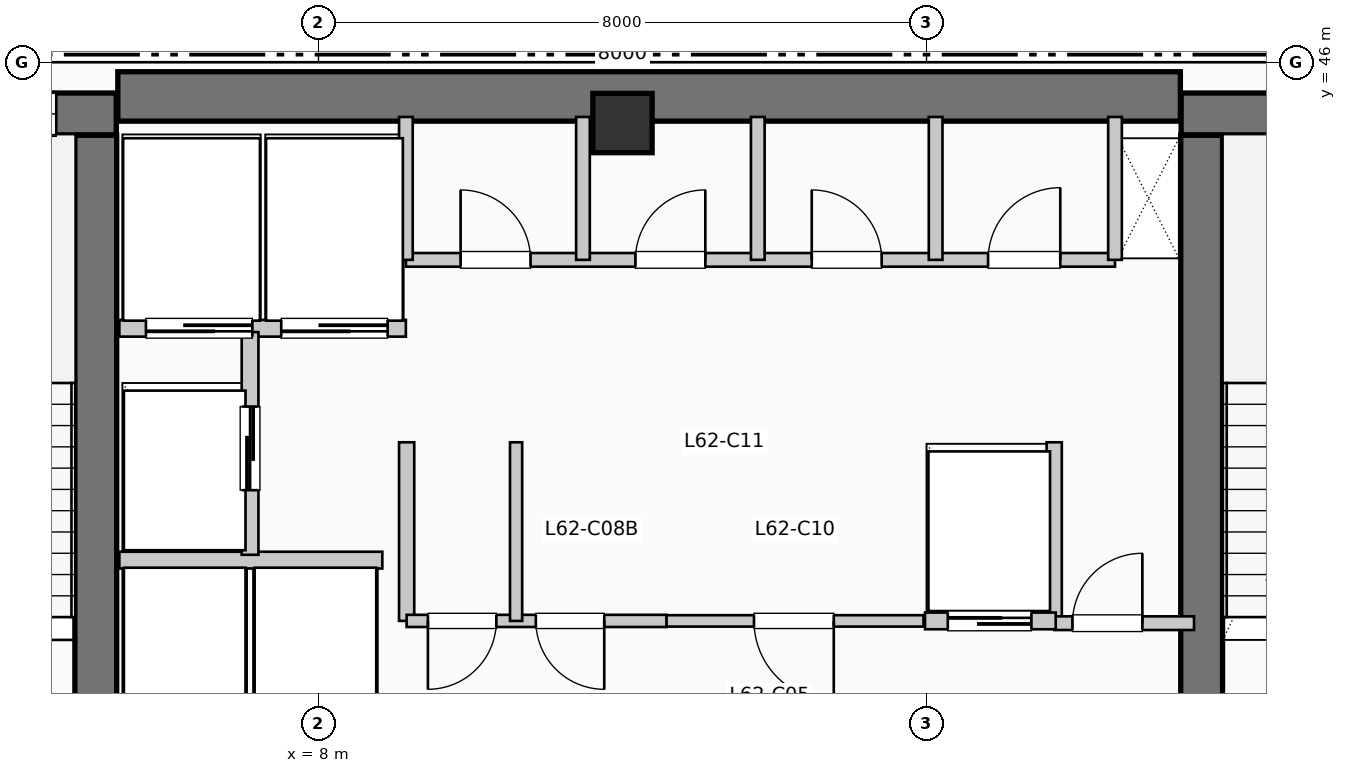
"""IFC4 building model, lengths in metres.
Left out: names, types, materials, properties, quantities, classifications, styles, units other than length and angle.
Written with IfcOpenShell. Run it as: python <this file> out.ifc"""

import sys

from ifc_helpers import new_model, si_unit, direction, frame, frame_2d, origin, origin_2d, place, context, subcontext, project, spatial, rectangle, extrude, element, fill, save


model = new_model("IFC4")
c1 = context("Model", 3, precision=1e-05, world=origin(), true_north=direction((0.0, 1.0)))
c2 = subcontext(c1, "Body", "Model", "MODEL_VIEW")
j1 = project(units=[si_unit("LENGTHUNIT", "METRE"), si_unit("PLANEANGLEUNIT", "RADIAN")], contexts=[c1])
p1 = place(None, origin())
s1 = spatial("IfcSite", under=j1, at=p1, CompositionType="ELEMENT")
p2 = place(p1, origin())
s2 = spatial("IfcBuilding", under=s1, at=p2, CompositionType="ELEMENT")
p3 = place(p2, frame((0.0, 0.0, 256.41)))
s3 = spatial("IfcBuildingStorey", under=s2, at=p3, CompositionType="ELEMENT", Elevation=256.41)
p4 = place(p3, frame((5.36, 45.55, 0.0), z_axis=(0.0, 0.0, 1.0), x_axis=(1.0, 0.0, 0.0)))
e1 = element("IfcWall", 1, at=p4, inside=s3, PredefinedType="SHEAR", context=c2, shape_type="SweptSolid", body=[
    extrude(rectangle(XDim=13.98, YDim=0.65, at=frame_2d((6.99, 0.0))), origin(), (0.0, 0.0, 1.0), 3.96),
])
p5 = place(p3, frame((5.07, 37.15, 0.0), z_axis=(0.0, 0.0, 1.0), x_axis=(0.0, 1.0, 0.0)))
e2 = element("IfcWall", 2, at=p5, inside=s3, PredefinedType="SHEAR", context=c2, shape_type="SweptSolid", body=[
    extrude(rectangle(XDim=7.89, YDim=0.55, at=frame_2d((3.945, 0.0))), origin(), (0.0, 0.0, 1.0), 3.96),
])
p6 = place(p3, frame((1.1, 45.32, 0.0), z_axis=(0.0, 0.0, 1.0), x_axis=(1.0, 0.0, 0.0)))
e3 = element("IfcWall", 3, at=p6, inside=s3, PredefinedType="SHEAR", context=c2, shape_type="SweptSolid", body=[
    extrude(rectangle(XDim=4.24, YDim=0.55, at=frame_2d((2.12, 0.0))), origin(), (0.0, 0.0, 1.0), 3.96),
])
p7 = place(p6, frame((2.05, 0.0, 1.05)))
e4 = element("IfcOpeningElement", 4, at=p7, cuts=e3, PredefinedType="OPENING", context=c2, shape_type="SweptSolid", body=[
    extrude(rectangle(XDim=1.4, YDim=1.8, at=frame_2d((0.7, 0.9))), frame((0.0, 0.285, 0.0), z_axis=(0.0, -1.0, 0.0), x_axis=(1.0, 0.0, 0.0)), (0.0, 0.0, 1.0), 0.57),
])
p8 = place(p3, frame((19.62, 37.15, 0.0), z_axis=(0.0, 0.0, 1.0), x_axis=(0.0, 1.0, 0.0)))
e5 = element("IfcWall", 5, at=p8, inside=s3, PredefinedType="SHEAR", context=c2, shape_type="SweptSolid", body=[
    extrude(rectangle(XDim=7.89, YDim=0.55, at=frame_2d((3.945, 0.0))), origin(), (0.0, 0.0, 1.0), 3.96),
])
p9 = place(p3, frame((19.35, 45.32, 0.0), z_axis=(0.0, 0.0, 1.0), x_axis=(1.0, 0.0, 0.0)))
e6 = element("IfcWall", 6, at=p9, inside=s3, PredefinedType="SHEAR", context=c2, shape_type="SweptSolid", body=[
    extrude(rectangle(XDim=3.69, YDim=0.55, at=frame_2d((1.845, 0.0))), origin(), (0.0, 0.0, 1.0), 3.96),
])
p10 = place(p9, frame((1.15, 0.0, 1.05)))
e7 = element("IfcOpeningElement", 7, at=p10, cuts=e6, PredefinedType="OPENING", context=c2, shape_type="SweptSolid", body=[
    extrude(rectangle(XDim=1.4, YDim=1.8, at=frame_2d((0.7, 0.9))), frame((0.0, 0.285, 0.0), z_axis=(0.0, -1.0, 0.0), x_axis=(1.0, 0.0, 0.0)), (0.0, 0.0, 1.0), 0.57),
])
p11 = place(p3, frame((12.0, 45.2, 0.0), z_axis=(0.0, 0.0, 1.0), x_axis=(1.0, 0.0, 0.0)))
e8 = element("IfcColumn", 8, at=p11, inside=s3, PredefinedType="COLUMN", context=c2, shape_type="SweptSolid", body=[
    extrude(rectangle(XDim=0.78, YDim=0.78, at=origin_2d()), origin(), (0.0, 0.0, 1.0), 3.96),
])
p12 = place(p3, frame((5.38, 39.45, 0.0), z_axis=(0.0, 0.0, 1.0), x_axis=(1.0, 0.0, 0.0)))
e9 = element("IfcWall", 9, at=p12, inside=s3, PredefinedType="PARTITIONING", context=c2, shape_type="SweptSolid", body=[
    extrude(rectangle(XDim=3.46, YDim=0.22, at=frame_2d((1.73, 0.0))), origin(), (0.0, 0.0, 1.0), 3.71),
])
p13 = place(p3, frame((5.38, 42.5, 0.0), z_axis=(0.0, 0.0, 1.0), x_axis=(1.0, 0.0, 0.0)))
e10 = element("IfcWall", 10, at=p13, inside=s3, PredefinedType="PARTITIONING", context=c2, shape_type="SweptSolid", body=[
    extrude(rectangle(XDim=3.77, YDim=0.22, at=frame_2d((1.885, 0.0))), origin(), (0.0, 0.0, 1.0), 3.71),
])
p14 = place(p13, frame((1.75, 0.0, 0.0), z_axis=(0.0, 0.0, 1.0), x_axis=(-1.0, 0.0, 0.0)))
e11 = element("IfcOpeningElement", 11, at=p14, cuts=e10, PredefinedType="OPENING", context=c2, shape_type="SweptSolid", body=[
    extrude(rectangle(XDim=1.4, YDim=2.2, at=frame_2d((0.7, 1.1))), frame((0.0, 0.12, 0.0), z_axis=(0.0, -1.0, 0.0), x_axis=(1.0, 0.0, 0.0)), (0.0, 0.0, 1.0), 0.24),
])
p15 = place(p13, frame((3.53, 0.0, 0.0), z_axis=(0.0, 0.0, 1.0), x_axis=(-1.0, 0.0, 0.0)))
e12 = element("IfcOpeningElement", 12, at=p15, cuts=e10, PredefinedType="OPENING", context=c2, shape_type="SweptSolid", body=[
    extrude(rectangle(XDim=1.4, YDim=2.2, at=frame_2d((0.7, 1.1))), frame((0.0, 0.12, 0.0), z_axis=(0.0, -1.0, 0.0), x_axis=(1.0, 0.0, 0.0)), (0.0, 0.0, 1.0), 0.24),
])
p16 = place(p3, frame((7.1, 39.52, 0.0), z_axis=(0.0, 0.0, 1.0), x_axis=(0.0, 1.0, 0.0)))
e13 = element("IfcWall", 13, at=p16, inside=s3, PredefinedType="PARTITIONING", context=c2, shape_type="SweptSolid", body=[
    extrude(rectangle(XDim=2.93, YDim=0.22, at=frame_2d((1.465, 0.0))), origin(), (0.0, 0.0, 1.0), 3.71),
])
p17 = place(p16, frame((0.85, 0.0, 0.0)))
e14 = element("IfcOpeningElement", 14, at=p17, cuts=e13, PredefinedType="OPENING", context=c2, shape_type="SweptSolid", body=[
    extrude(rectangle(XDim=1.1, YDim=2.2, at=frame_2d((0.55, 1.1))), frame((0.0, 0.12, 0.0), z_axis=(0.0, -1.0, 0.0), x_axis=(1.0, 0.0, 0.0)), (0.0, 0.0, 1.0), 0.24),
])
for number, where, z_axis, x_axis in (
    (15, (9.16, 38.65, 0.0), (0.0, 0.0, 1.0), (0.0, 1.0, 0.0)),
    (16, (17.68, 38.65, 0.0), (0.0, 0.0, 1.0), (0.0, 1.0, 0.0)),
):
    element("IfcWall", number, at=place(p3, frame(where, z_axis=z_axis, x_axis=x_axis)), inside=s3, PredefinedType="PARTITIONING", context=c2, shape_type="SweptSolid", body=[
        extrude(rectangle(XDim=2.35, YDim=0.2, at=frame_2d((1.175, 0.0))), origin(), (0.0, 0.0, 1.0), 3.71),
    ])
p18 = place(p3, frame((17.68, 38.62, 0.0), z_axis=(0.0, 0.0, 1.0), x_axis=(1.0, 0.0, 0.0)))
e17 = element("IfcWall", 17, at=p18, inside=s3, PredefinedType="PARTITIONING", context=c2, shape_type="SweptSolid", body=[
    extrude(rectangle(XDim=1.84, YDim=0.18, at=frame_2d((0.92, 0.0))), origin(), (0.0, 0.0, 1.0), 3.71),
])
p19 = place(p18, frame((0.24, 0.0, 0.0)))
e18 = element("IfcOpeningElement", 18, at=p19, cuts=e17, PredefinedType="OPENING", context=c2, shape_type="SweptSolid", body=[
    extrude(rectangle(XDim=0.92, YDim=2.1, at=frame_2d((0.46, 1.05))), frame((0.0, 0.1, 0.0), z_axis=(0.0, -1.0, 0.0), x_axis=(1.0, 0.0, 0.0)), (0.0, 0.0, 1.0), 0.2),
])
p20 = place(p3, frame((9.16, 38.65, 0.0), z_axis=(0.0, 0.0, 1.0), x_axis=(1.0, 0.0, 0.0)))
e19 = element("IfcWall", 19, at=p20, inside=s3, PredefinedType="PARTITIONING", context=c2, shape_type="SweptSolid", body=[
    extrude(rectangle(XDim=3.42, YDim=0.16, at=frame_2d((1.71, 0.0))), origin(), (0.0, 0.0, 1.0), 3.71),
])
p21 = place(p20, frame((1.18, 0.0, 0.0), z_axis=(0.0, 0.0, 1.0), x_axis=(-1.0, 0.0, 0.0)))
e20 = element("IfcOpeningElement", 20, at=p21, cuts=e19, PredefinedType="OPENING", context=c2, shape_type="SweptSolid", body=[
    extrude(rectangle(XDim=0.9, YDim=2.15, at=frame_2d((0.45, 1.075))), frame((0.0, 0.09, 0.0), z_axis=(0.0, -1.0, 0.0), x_axis=(1.0, 0.0, 0.0)), (0.0, 0.0, 1.0), 0.18),
])
p22 = place(p20, frame((2.6, 0.0, 0.0), z_axis=(0.0, 0.0, 1.0), x_axis=(-1.0, 0.0, 0.0)))
e21 = element("IfcOpeningElement", 21, at=p22, cuts=e19, PredefinedType="OPENING", context=c2, shape_type="SweptSolid", body=[
    extrude(rectangle(XDim=0.9, YDim=2.15, at=frame_2d((0.45, 1.075))), frame((0.0, 0.09, 0.0), z_axis=(0.0, -1.0, 0.0), x_axis=(1.0, 0.0, 0.0)), (0.0, 0.0, 1.0), 0.18),
])
p23 = place(p3, frame((10.6, 38.65, 0.0), z_axis=(0.0, 0.0, 1.0), x_axis=(0.0, 1.0, 0.0)))
e22 = element("IfcWall", 22, at=p23, inside=s3, PredefinedType="PARTITIONING", context=c2, shape_type="SweptSolid", body=[
    extrude(rectangle(XDim=2.35, YDim=0.16, at=frame_2d((1.175, 0.0))), origin(), (0.0, 0.0, 1.0), 3.71),
])
p24 = place(p3, frame((12.58, 38.65, 0.0), z_axis=(0.0, 0.0, 1.0), x_axis=(1.0, 0.0, 0.0)))
e23 = element("IfcWall", 23, at=p24, inside=s3, PredefinedType="PARTITIONING", context=c2, shape_type="SweptSolid", body=[
    extrude(rectangle(XDim=3.38, YDim=0.15, at=frame_2d((1.69, 0.0))), origin(), (0.0, 0.0, 1.0), 3.71),
])
p25 = place(p24, frame((2.2, 0.0, 0.0), z_axis=(0.0, 0.0, 1.0), x_axis=(-1.0, 0.0, 0.0)))
e24 = element("IfcOpeningElement", 24, at=p25, cuts=e23, PredefinedType="OPENING", context=c2, shape_type="SweptSolid", body=[
    extrude(rectangle(XDim=1.05, YDim=2.15, at=frame_2d((0.525, 1.075))), frame((0.0, 0.085, 0.0), z_axis=(0.0, -1.0, 0.0), x_axis=(1.0, 0.0, 0.0)), (0.0, 0.0, 1.0), 0.17),
])
p26 = place(p3, frame((15.98, 38.65, 0.0), z_axis=(0.0, 0.0, 1.0), x_axis=(1.0, 0.0, 0.0)))
e25 = element("IfcWall", 25, at=p26, inside=s3, PredefinedType="PARTITIONING", context=c2, shape_type="SweptSolid", body=[
    extrude(rectangle(XDim=1.72, YDim=0.22, at=frame_2d((0.86, 0.0))), origin(), (0.0, 0.0, 1.0), 3.71),
])
p27 = place(p26, frame((0.3, 0.0, 0.0)))
e26 = element("IfcOpeningElement", 26, at=p27, cuts=e25, PredefinedType="OPENING", context=c2, shape_type="SweptSolid", body=[
    extrude(rectangle(XDim=1.1, YDim=2.2, at=frame_2d((0.55, 1.1))), frame((0.0, 0.12, 0.0), z_axis=(0.0, -1.0, 0.0), x_axis=(1.0, 0.0, 0.0)), (0.0, 0.0, 1.0), 0.24),
])
p28 = place(p3, frame((9.15, 43.4, 0.0), z_axis=(0.0, 0.0, 1.0), x_axis=(1.0, 0.0, 0.0)))
e27 = element("IfcWall", 27, at=p28, inside=s3, PredefinedType="PLUMBINGWALL", context=c2, shape_type="SweptSolid", body=[
    extrude(rectangle(XDim=9.33, YDim=0.18, at=frame_2d((4.665, 0.0))), origin(), (0.0, 0.0, 1.0), 3.71),
])
p29 = place(p28, frame((0.72, 0.0, 0.0)))
e28 = element("IfcOpeningElement", 28, at=p29, cuts=e27, PredefinedType="OPENING", context=c2, shape_type="SweptSolid", body=[
    extrude(rectangle(XDim=0.92, YDim=2.1, at=frame_2d((0.46, 1.05))), frame((0.0, 0.1, 0.0), z_axis=(0.0, -1.0, 0.0), x_axis=(1.0, 0.0, 0.0)), (0.0, 0.0, 1.0), 0.2),
])
p30 = place(p28, frame((3.02, 0.0, 0.0)))
e29 = element("IfcOpeningElement", 29, at=p30, cuts=e27, PredefinedType="OPENING", context=c2, shape_type="SweptSolid", body=[
    extrude(rectangle(XDim=0.92, YDim=2.1, at=frame_2d((0.46, 1.05))), frame((0.0, 0.1, 0.0), z_axis=(0.0, -1.0, 0.0), x_axis=(1.0, 0.0, 0.0)), (0.0, 0.0, 1.0), 0.2),
])
p31 = place(p28, frame((5.34, 0.0, 0.0)))
e30 = element("IfcOpeningElement", 30, at=p31, cuts=e27, PredefinedType="OPENING", context=c2, shape_type="SweptSolid", body=[
    extrude(rectangle(XDim=0.92, YDim=2.1, at=frame_2d((0.46, 1.05))), frame((0.0, 0.1, 0.0), z_axis=(0.0, -1.0, 0.0), x_axis=(1.0, 0.0, 0.0)), (0.0, 0.0, 1.0), 0.2),
])
p32 = place(p28, frame((7.66, 0.0, 0.0)))
e31 = element("IfcOpeningElement", 31, at=p32, cuts=e27, PredefinedType="OPENING", context=c2, shape_type="SweptSolid", body=[
    extrude(rectangle(XDim=0.95, YDim=2.1, at=frame_2d((0.475, 1.05))), frame((0.0, 0.1, 0.0), z_axis=(0.0, -1.0, 0.0), x_axis=(1.0, 0.0, 0.0)), (0.0, 0.0, 1.0), 0.2),
])
for number, where, z_axis, x_axis in (
    (32, (9.15, 43.4, 0.0), (0.0, 0.0, 1.0), (0.0, 1.0, 0.0)),
    (33, (18.48, 43.4, 0.0), (0.0, 0.0, 1.0), (0.0, 1.0, 0.0)),
    (34, (11.48, 43.4, 0.0), (0.0, 0.0, 1.0), (0.0, 1.0, 0.0)),
    (35, (13.78, 43.4, 0.0), (0.0, 0.0, 1.0), (0.0, 1.0, 0.0)),
    (36, (16.12, 43.4, 0.0), (0.0, 0.0, 1.0), (0.0, 1.0, 0.0)),
):
    element("IfcWall", number, at=place(p3, frame(where, z_axis=z_axis, x_axis=x_axis)), inside=s3, PredefinedType="PLUMBINGWALL", context=c2, shape_type="SweptSolid", body=[
        extrude(rectangle(XDim=1.88, YDim=0.18, at=frame_2d((0.94, 0.0))), origin(), (0.0, 0.0, 1.0), 3.71),
    ])
p33 = place(p7, origin())
e37 = element("IfcWindow", 37, at=p33, inside=s3, PartitioningType="SINGLE_PANEL", PredefinedType="WINDOW", context=c2, shape_type="SweptSolid", body=[
    extrude(rectangle(XDim=1.4, YDim=1.8, at=frame_2d((0.7, 0.9))), frame((0.0, 0.03, 0.0), z_axis=(0.0, -1.0, 0.0), x_axis=(1.0, 0.0, 0.0)), (0.0, 0.0, 1.0), 0.06),
])
fill(e4, e37)
p34 = place(p14, origin())
e38 = element("IfcDoor", 38, at=p34, inside=s3, OperationType="SLIDING_TO_LEFT", PredefinedType="DOOR", context=c2, shape_type="SweptSolid", body=[
    extrude(rectangle(XDim=1.4, YDim=2.2, at=frame_2d((0.7, 1.1))), frame((0.0, 0.025, 0.0), z_axis=(0.0, -1.0, 0.0), x_axis=(1.0, 0.0, 0.0)), (0.0, 0.0, 1.0), 0.05),
])
fill(e11, e38)
p35 = place(p15, origin())
e39 = element("IfcDoor", 39, at=p35, inside=s3, OperationType="SLIDING_TO_LEFT", PredefinedType="DOOR", context=c2, shape_type="SweptSolid", body=[
    extrude(rectangle(XDim=1.4, YDim=2.2, at=frame_2d((0.7, 1.1))), frame((0.0, 0.025, 0.0), z_axis=(0.0, -1.0, 0.0), x_axis=(1.0, 0.0, 0.0)), (0.0, 0.0, 1.0), 0.05),
])
fill(e12, e39)
p36 = place(p17, origin())
e40 = element("IfcDoor", 40, at=p36, inside=s3, OperationType="SLIDING_TO_LEFT", PredefinedType="DOOR", context=c2, shape_type="SweptSolid", body=[
    extrude(rectangle(XDim=1.1, YDim=2.2, at=frame_2d((0.55, 1.1))), frame((0.0, 0.025, 0.0), z_axis=(0.0, -1.0, 0.0), x_axis=(1.0, 0.0, 0.0)), (0.0, 0.0, 1.0), 0.05),
])
fill(e14, e40)
p37 = place(p19, origin())
e41 = element("IfcDoor", 41, at=p37, inside=s3, OperationType="SINGLE_SWING_RIGHT", PredefinedType="DOOR", context=c2, shape_type="SweptSolid", body=[
    extrude(rectangle(XDim=0.92, YDim=2.1, at=frame_2d((0.46, 1.05))), frame((0.0, 0.025, 0.0), z_axis=(0.0, -1.0, 0.0), x_axis=(1.0, 0.0, 0.0)), (0.0, 0.0, 1.0), 0.05),
])
fill(e18, e41)
p38 = place(p21, origin())
e42 = element("IfcDoor", 42, at=p38, inside=s3, OperationType="SINGLE_SWING_LEFT", PredefinedType="DOOR", context=c2, shape_type="SweptSolid", body=[
    extrude(rectangle(XDim=0.9, YDim=2.15, at=frame_2d((0.45, 1.075))), frame((0.0, 0.025, 0.0), z_axis=(0.0, -1.0, 0.0), x_axis=(1.0, 0.0, 0.0)), (0.0, 0.0, 1.0), 0.05),
])
fill(e20, e42)
p39 = place(p22, origin())
e43 = element("IfcDoor", 43, at=p39, inside=s3, OperationType="SINGLE_SWING_RIGHT", PredefinedType="DOOR", context=c2, shape_type="SweptSolid", body=[
    extrude(rectangle(XDim=0.9, YDim=2.15, at=frame_2d((0.45, 1.075))), frame((0.0, 0.025, 0.0), z_axis=(0.0, -1.0, 0.0), x_axis=(1.0, 0.0, 0.0)), (0.0, 0.0, 1.0), 0.05),
])
fill(e21, e43)
p40 = place(p25, origin())
e44 = element("IfcDoor", 44, at=p40, inside=s3, OperationType="SINGLE_SWING_RIGHT", PredefinedType="DOOR", context=c2, shape_type="SweptSolid", body=[
    extrude(rectangle(XDim=1.05, YDim=2.15, at=frame_2d((0.525, 1.075))), frame((0.0, 0.025, 0.0), z_axis=(0.0, -1.0, 0.0), x_axis=(1.0, 0.0, 0.0)), (0.0, 0.0, 1.0), 0.05),
])
fill(e24, e44)
p41 = place(p27, origin())
e45 = element("IfcDoor", 45, at=p41, inside=s3, OperationType="SLIDING_TO_LEFT", PredefinedType="DOOR", context=c2, shape_type="SweptSolid", body=[
    extrude(rectangle(XDim=1.1, YDim=2.2, at=frame_2d((0.55, 1.1))), frame((0.0, 0.025, 0.0), z_axis=(0.0, -1.0, 0.0), x_axis=(1.0, 0.0, 0.0)), (0.0, 0.0, 1.0), 0.05),
])
fill(e26, e45)
p42 = place(p29, origin())
e46 = element("IfcDoor", 46, at=p42, inside=s3, OperationType="SINGLE_SWING_LEFT", PredefinedType="DOOR", context=c2, shape_type="SweptSolid", body=[
    extrude(rectangle(XDim=0.92, YDim=2.1, at=frame_2d((0.46, 1.05))), frame((0.0, 0.025, 0.0), z_axis=(0.0, -1.0, 0.0), x_axis=(1.0, 0.0, 0.0)), (0.0, 0.0, 1.0), 0.05),
])
fill(e28, e46)
p43 = place(p30, origin())
e47 = element("IfcDoor", 47, at=p43, inside=s3, OperationType="SINGLE_SWING_RIGHT", PredefinedType="DOOR", context=c2, shape_type="SweptSolid", body=[
    extrude(rectangle(XDim=0.92, YDim=2.1, at=frame_2d((0.46, 1.05))), frame((0.0, 0.025, 0.0), z_axis=(0.0, -1.0, 0.0), x_axis=(1.0, 0.0, 0.0)), (0.0, 0.0, 1.0), 0.05),
])
fill(e29, e47)
p44 = place(p31, origin())
e48 = element("IfcDoor", 48, at=p44, inside=s3, OperationType="SINGLE_SWING_LEFT", PredefinedType="DOOR", context=c2, shape_type="SweptSolid", body=[
    extrude(rectangle(XDim=0.92, YDim=2.1, at=frame_2d((0.46, 1.05))), frame((0.0, 0.025, 0.0), z_axis=(0.0, -1.0, 0.0), x_axis=(1.0, 0.0, 0.0)), (0.0, 0.0, 1.0), 0.05),
])
fill(e30, e48)
p45 = place(p32, origin())
e49 = element("IfcDoor", 49, at=p45, inside=s3, OperationType="SINGLE_SWING_RIGHT", PredefinedType="DOOR", context=c2, shape_type="SweptSolid", body=[
    extrude(rectangle(XDim=0.95, YDim=2.1, at=frame_2d((0.475, 1.05))), frame((0.0, 0.025, 0.0), z_axis=(0.0, -1.0, 0.0), x_axis=(1.0, 0.0, 0.0)), (0.0, 0.0, 1.0), 0.05),
])
fill(e31, e49)
save(model, sys.argv[1])
